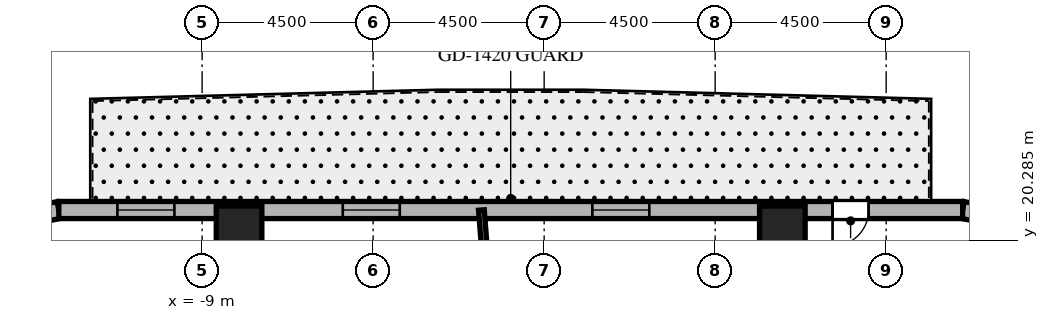
"""IFC4 building model, lengths in metres.
Left out: names, types, materials, properties, quantities, classifications, styles, units other than length and angle.
Written with IfcOpenShell. Run it as: python <this file> out.ifc"""

import sys

from ifc_helpers import new_model, si_unit, direction, frame, frame_2d, origin, origin_2d, place, context, subcontext, project, spatial, rectangle, extrude, element, fill, save


model = new_model("IFC4")
c1 = context("Model", 3, precision=1e-05, world=origin(), true_north=direction((0.0, 1.0)))
c2 = subcontext(c1, "Body", "Model", "MODEL_VIEW")
j1 = project(units=[si_unit("LENGTHUNIT", "METRE"), si_unit("PLANEANGLEUNIT", "RADIAN")], contexts=[c1])
p1 = place(None, origin())
s1 = spatial("IfcSite", under=j1, at=p1, CompositionType="ELEMENT")
p2 = place(p1, origin())
s2 = spatial("IfcBuilding", under=s1, at=p2, CompositionType="ELEMENT")
p3 = place(p2, frame((0.0, 0.0, 91.4)))
s3 = spatial("IfcBuildingStorey", under=s2, at=p3, CompositionType="ELEMENT", Elevation=91.4)
for number, where, z_axis, x_axis in (
    (1, (6.268, 20.58, 0.0), (0.0, 0.0, 1.0), (1.0, 0.0, 0.0)),
    (2, (-8.028, 20.58, 0.0), (0.0, 0.0, 1.0), (1.0, 0.0, 0.0)),
):
    element("IfcColumn", number, at=place(p3, frame(where, z_axis=z_axis, x_axis=x_axis)), inside=s3, PredefinedType="COLUMN", context=c2, shape_type="SweptSolid", body=[
        extrude(rectangle(XDim=1.2, YDim=1.2, at=origin_2d()), origin(), (0.0, 0.0, 1.0), 3.7),
    ])
p4 = place(p3, frame((12.259, 20.84, 0.0), z_axis=(0.0, 0.0, 1.0), x_axis=(-0.982730354425, 0.185043374624, 0.0)))
e3 = element("IfcWall", 3, at=p4, inside=s3, PredefinedType="SOLIDWALL", context=c2, shape_type="SweptSolid", body=[
    extrude(rectangle(XDim=1.269, YDim=0.45, at=frame_2d((0.635, 0.0))), origin(), (0.0, 0.0, 1.0), 3.4),
])
p5 = place(p3, frame((-12.771, 21.075, 0.0), z_axis=(0.0, 0.0, 1.0), x_axis=(-0.97874281988, -0.205091424819, 0.0)))
e4 = element("IfcWall", 4, at=p5, inside=s3, PredefinedType="SOLIDWALL", context=c2, shape_type="SweptSolid", body=[
    extrude(rectangle(XDim=1.406, YDim=0.45, at=frame_2d((0.703, 0.0))), origin(), (0.0, 0.0, 1.0), 3.4),
])
p6 = place(p3, frame((11.012, 21.075, 0.0), z_axis=(0.0, 0.0, 1.0), x_axis=(-1.0, 0.0, 0.0)))
e5 = element("IfcWall", 5, at=p6, inside=s3, PredefinedType="SOLIDWALL", context=c2, shape_type="SweptSolid", body=[
    extrude(rectangle(XDim=23.782, YDim=0.45, at=frame_2d((11.891, 0.0))), origin(), (0.0, 0.0, 1.0), 3.4),
])
p7 = place(p6, frame((2.473, 0.0, 0.0)))
e6 = element("IfcOpeningElement", 6, at=p7, cuts=e5, PredefinedType="OPENING", context=c2, shape_type="SweptSolid", body=[
    extrude(rectangle(XDim=0.95, YDim=2.15, at=frame_2d((0.475, 1.075))), frame((0.0, 0.235, 0.0), z_axis=(0.0, -1.0, 0.0), x_axis=(1.0, 0.0, 0.0)), (0.0, 0.0, 1.0), 0.47),
])
p8 = place(p6, frame((8.244, 0.0, 0.8)))
e7 = element("IfcOpeningElement", 7, at=p8, cuts=e5, PredefinedType="OPENING", context=c2, shape_type="SweptSolid", body=[
    extrude(rectangle(XDim=1.5, YDim=1.8, at=frame_2d((0.75, 0.9))), frame((0.0, 0.235, 0.0), z_axis=(0.0, -1.0, 0.0), x_axis=(1.0, 0.0, 0.0)), (0.0, 0.0, 1.0), 0.47),
])
p9 = place(p6, frame((14.811, 0.0, 0.8)))
e8 = element("IfcOpeningElement", 8, at=p9, cuts=e5, PredefinedType="OPENING", context=c2, shape_type="SweptSolid", body=[
    extrude(rectangle(XDim=1.5, YDim=1.8, at=frame_2d((0.75, 0.9))), frame((0.0, 0.235, 0.0), z_axis=(0.0, -1.0, 0.0), x_axis=(1.0, 0.0, 0.0)), (0.0, 0.0, 1.0), 0.47),
])
p10 = place(p6, frame((20.741, 0.0, 0.8)))
e9 = element("IfcOpeningElement", 9, at=p10, cuts=e5, PredefinedType="OPENING", context=c2, shape_type="SweptSolid", body=[
    extrude(rectangle(XDim=1.5, YDim=1.8, at=frame_2d((0.75, 0.9))), frame((0.0, 0.235, 0.0), z_axis=(0.0, -1.0, 0.0), x_axis=(1.0, 0.0, 0.0)), (0.0, 0.0, 1.0), 0.47),
])
p11 = place(p3, frame((5.835, 9.85, 0.0), z_axis=(0.0, 0.0, 1.0), x_axis=(0.509682574642, 0.860362524234, 0.0)))
e10 = element("IfcWall", 10, at=p11, inside=s3, PredefinedType="PARTITIONING", context=c2, shape_type="SweptSolid", body=[
    extrude(rectangle(XDim=12.568, YDim=0.15, at=frame_2d((6.284, 0.0))), origin(), (0.0, 0.0, 1.0), 2.54),
])
p12 = place(p3, frame((3.0, 9.85, 0.0), z_axis=(0.0, 0.0, 1.0), x_axis=(0.291352035382, 0.95661590593, 0.0)))
e11 = element("IfcWall", 11, at=p12, inside=s3, PredefinedType="PARTITIONING", context=c2, shape_type="SweptSolid", body=[
    extrude(rectangle(XDim=11.734, YDim=0.15, at=frame_2d((5.867, 0.0))), origin(), (0.0, 0.0, 1.0), 2.54),
])
p13 = place(p3, frame((-0.772, 9.85, 0.0), z_axis=(0.0, 0.0, 1.0), x_axis=(-0.078125747145, 0.996943512759, 0.0)))
e12 = element("IfcWall", 12, at=p13, inside=s3, PredefinedType="PARTITIONING", context=c2, shape_type="SweptSolid", body=[
    extrude(rectangle(XDim=11.259, YDim=0.15, at=frame_2d((5.63, 0.0))), origin(), (0.0, 0.0, 1.0), 2.54),
])
p14 = place(p3, frame((-3.842, 9.85, 0.0), z_axis=(0.0, 0.0, 1.0), x_axis=(-0.363432685593, 0.931620460833, 0.0)))
e13 = element("IfcWall", 13, at=p14, inside=s3, PredefinedType="PARTITIONING", context=c2, shape_type="SweptSolid", body=[
    extrude(rectangle(XDim=12.049, YDim=0.15, at=frame_2d((6.024, 0.0))), origin(), (0.0, 0.0, 1.0), 2.54),
])
p15 = place(p3, frame((-6.454, 9.85, 0.0), z_axis=(0.0, 0.0, 1.0), x_axis=(-0.548052950111, 0.836443640584, 0.0)))
e14 = element("IfcWall", 14, at=p15, inside=s3, PredefinedType="PARTITIONING", context=c2, shape_type="SweptSolid", body=[
    extrude(rectangle(XDim=13.019, YDim=0.15, at=frame_2d((6.51, 0.0))), origin(), (0.0, 0.0, 1.0), 2.54),
])
p16 = place(p7, origin())
e15 = element("IfcDoor", 15, at=p16, inside=s3, OperationType="SINGLE_SWING_RIGHT", PredefinedType="DOOR", context=c2, shape_type="SweptSolid", body=[
    extrude(rectangle(XDim=0.95, YDim=2.15, at=frame_2d((0.475, 1.075))), frame((0.0, 0.025, 0.0), z_axis=(0.0, -1.0, 0.0), x_axis=(1.0, 0.0, 0.0)), (0.0, 0.0, 1.0), 0.05),
])
fill(e6, e15)
p17 = place(p8, origin())
e16 = element("IfcWindow", 16, at=p17, inside=s3, PartitioningType="SINGLE_PANEL", PredefinedType="WINDOW", context=c2, shape_type="SweptSolid", body=[
    extrude(rectangle(XDim=1.5, YDim=1.8, at=frame_2d((0.75, 0.9))), frame((0.0, 0.03, 0.0), z_axis=(0.0, -1.0, 0.0), x_axis=(1.0, 0.0, 0.0)), (0.0, 0.0, 1.0), 0.06),
])
fill(e7, e16)
p18 = place(p9, origin())
e17 = element("IfcWindow", 17, at=p18, inside=s3, PartitioningType="SINGLE_PANEL", PredefinedType="WINDOW", context=c2, shape_type="SweptSolid", body=[
    extrude(rectangle(XDim=1.5, YDim=1.8, at=frame_2d((0.75, 0.9))), frame((0.0, 0.03, 0.0), z_axis=(0.0, -1.0, 0.0), x_axis=(1.0, 0.0, 0.0)), (0.0, 0.0, 1.0), 0.06),
])
fill(e8, e17)
p19 = place(p10, origin())
e18 = element("IfcWindow", 18, at=p19, inside=s3, PartitioningType="SINGLE_PANEL", PredefinedType="WINDOW", context=c2, shape_type="SweptSolid", body=[
    extrude(rectangle(XDim=1.5, YDim=1.8, at=frame_2d((0.75, 0.9))), frame((0.0, 0.03, 0.0), z_axis=(0.0, -1.0, 0.0), x_axis=(1.0, 0.0, 0.0)), (0.0, 0.0, 1.0), 0.06),
])
fill(e9, e18)
save(model, sys.argv[1])
